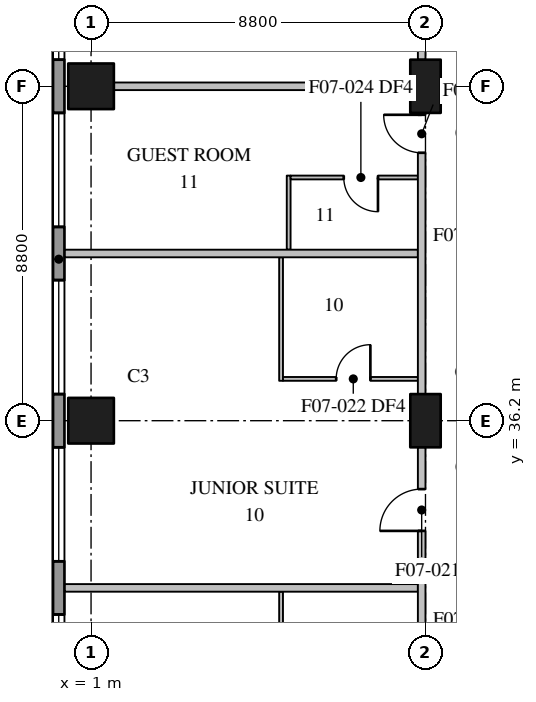
"""IFC4 building model, lengths in metres.
Left out: names, types, materials, properties, quantities, classifications, styles, units other than length and angle.
Written with IfcOpenShell. Run it as: python <this file> out.ifc"""

import sys

from ifc_helpers import new_model, si_unit, direction, frame, frame_2d, origin, origin_2d, place, context, subcontext, project, spatial, rectangle, extrude, element, fill, save


model = new_model("IFC4")
c1 = context("Model", 3, precision=1e-05, world=origin(), true_north=direction((0.0, 1.0)))
c2 = subcontext(c1, "Body", "Model", "MODEL_VIEW")
j1 = project(units=[si_unit("LENGTHUNIT", "METRE"), si_unit("PLANEANGLEUNIT", "RADIAN")], contexts=[c1])
p1 = place(None, origin())
s1 = spatial("IfcSite", under=j1, at=p1, CompositionType="ELEMENT")
p2 = place(p1, origin())
s2 = spatial("IfcBuilding", under=s1, at=p2, CompositionType="ELEMENT")
p3 = place(p2, frame((0.0, 0.0, 87.1)))
s3 = spatial("IfcBuildingStorey", under=s2, at=p3, CompositionType="ELEMENT", Elevation=87.1)
for number, where, z_axis, x_axis in (
    (1, (1.0, 36.2, 0.0), (0.0, 0.0, 1.0), (1.0, 0.0, 0.0)),
    (2, (1.0, 45.0, 0.0), (0.0, 0.0, 1.0), (1.0, 0.0, 0.0)),
):
    element("IfcColumn", number, at=place(p3, frame(where, z_axis=z_axis, x_axis=x_axis)), inside=s3, PredefinedType="COLUMN", context=c2, shape_type="SweptSolid", body=[
        extrude(rectangle(XDim=1.2, YDim=1.2, at=origin_2d()), origin(), (0.0, 0.0, 1.0), 3.7),
    ])
for number, where, z_axis, x_axis in (
    (3, (9.8, 36.2, 0.0), (0.0, 0.0, 1.0), (0.0, 1.0, 0.0)),
    (4, (9.8, 45.0, 0.0), (0.0, 0.0, 1.0), (0.0, 1.0, 0.0)),
):
    element("IfcColumn", number, at=place(p3, frame(where, z_axis=z_axis, x_axis=x_axis)), inside=s3, PredefinedType="COLUMN", context=c2, shape_type="SweptSolid", body=[
        extrude(rectangle(XDim=1.4, YDim=0.8, at=origin_2d()), origin(), (0.0, 0.0, 1.0), 3.7),
    ])
p4 = place(p3, frame((0.15, 78.7, 0.0), z_axis=(0.0, 0.0, 1.0), x_axis=(0.0, -1.0, 0.0)))
e5 = element("IfcWall", 5, at=p4, inside=s3, PredefinedType="STANDARD", context=c2, shape_type="SweptSolid", body=[
    extrude(rectangle(XDim=76.5, YDim=0.3, at=frame_2d((38.25, 0.0))), origin(), (0.0, 0.0, 1.0), 3.4),
])
p5 = place(p4, frame((3.6, 0.0, 0.75)))
e6 = element("IfcOpeningElement", 6, at=p5, cuts=e5, PredefinedType="OPENING", context=c2, shape_type="SweptSolid", body=[
    extrude(rectangle(XDim=3.0, YDim=2.3, at=frame_2d((1.5, 1.15))), frame((0.0, 0.16, 0.0), z_axis=(0.0, -1.0, 0.0), x_axis=(1.0, 0.0, 0.0)), (0.0, 0.0, 1.0), 0.32),
])
p6 = place(p4, frame((8.0, 0.0, 0.75)))
e7 = element("IfcOpeningElement", 7, at=p6, cuts=e5, PredefinedType="OPENING", context=c2, shape_type="SweptSolid", body=[
    extrude(rectangle(XDim=3.0, YDim=2.3, at=frame_2d((1.5, 1.15))), frame((0.0, 0.16, 0.0), z_axis=(0.0, -1.0, 0.0), x_axis=(1.0, 0.0, 0.0)), (0.0, 0.0, 1.0), 0.32),
])
p7 = place(p4, frame((12.4, 0.0, 0.75)))
e8 = element("IfcOpeningElement", 8, at=p7, cuts=e5, PredefinedType="OPENING", context=c2, shape_type="SweptSolid", body=[
    extrude(rectangle(XDim=3.0, YDim=2.3, at=frame_2d((1.5, 1.15))), frame((0.0, 0.16, 0.0), z_axis=(0.0, -1.0, 0.0), x_axis=(1.0, 0.0, 0.0)), (0.0, 0.0, 1.0), 0.32),
])
p8 = place(p4, frame((16.8, 0.0, 0.75)))
e9 = element("IfcOpeningElement", 9, at=p8, cuts=e5, PredefinedType="OPENING", context=c2, shape_type="SweptSolid", body=[
    extrude(rectangle(XDim=3.0, YDim=2.3, at=frame_2d((1.5, 1.15))), frame((0.0, 0.16, 0.0), z_axis=(0.0, -1.0, 0.0), x_axis=(1.0, 0.0, 0.0)), (0.0, 0.0, 1.0), 0.32),
])
p9 = place(p4, frame((21.2, 0.0, 0.75)))
e10 = element("IfcOpeningElement", 10, at=p9, cuts=e5, PredefinedType="OPENING", context=c2, shape_type="SweptSolid", body=[
    extrude(rectangle(XDim=3.0, YDim=2.3, at=frame_2d((1.5, 1.15))), frame((0.0, 0.16, 0.0), z_axis=(0.0, -1.0, 0.0), x_axis=(1.0, 0.0, 0.0)), (0.0, 0.0, 1.0), 0.32),
])
p10 = place(p4, frame((25.6, 0.0, 0.75)))
e11 = element("IfcOpeningElement", 11, at=p10, cuts=e5, PredefinedType="OPENING", context=c2, shape_type="SweptSolid", body=[
    extrude(rectangle(XDim=3.0, YDim=2.3, at=frame_2d((1.5, 1.15))), frame((0.0, 0.16, 0.0), z_axis=(0.0, -1.0, 0.0), x_axis=(1.0, 0.0, 0.0)), (0.0, 0.0, 1.0), 0.32),
])
p11 = place(p4, frame((30.0, 0.0, 0.75)))
e12 = element("IfcOpeningElement", 12, at=p11, cuts=e5, PredefinedType="OPENING", context=c2, shape_type="SweptSolid", body=[
    extrude(rectangle(XDim=3.0, YDim=2.3, at=frame_2d((1.5, 1.15))), frame((0.0, 0.16, 0.0), z_axis=(0.0, -1.0, 0.0), x_axis=(1.0, 0.0, 0.0)), (0.0, 0.0, 1.0), 0.32),
])
p12 = place(p4, frame((34.4, 0.0, 0.75)))
e13 = element("IfcOpeningElement", 13, at=p12, cuts=e5, PredefinedType="OPENING", context=c2, shape_type="SweptSolid", body=[
    extrude(rectangle(XDim=3.0, YDim=2.3, at=frame_2d((1.5, 1.15))), frame((0.0, 0.16, 0.0), z_axis=(0.0, -1.0, 0.0), x_axis=(1.0, 0.0, 0.0)), (0.0, 0.0, 1.0), 0.32),
])
p13 = place(p4, frame((38.8, 0.0, 0.75)))
e14 = element("IfcOpeningElement", 14, at=p13, cuts=e5, PredefinedType="OPENING", context=c2, shape_type="SweptSolid", body=[
    extrude(rectangle(XDim=3.0, YDim=2.3, at=frame_2d((1.5, 1.15))), frame((0.0, 0.16, 0.0), z_axis=(0.0, -1.0, 0.0), x_axis=(1.0, 0.0, 0.0)), (0.0, 0.0, 1.0), 0.32),
])
p14 = place(p4, frame((43.2, 0.0, 0.75)))
e15 = element("IfcOpeningElement", 15, at=p14, cuts=e5, PredefinedType="OPENING", context=c2, shape_type="SweptSolid", body=[
    extrude(rectangle(XDim=3.0, YDim=2.3, at=frame_2d((1.5, 1.15))), frame((0.0, 0.16, 0.0), z_axis=(0.0, -1.0, 0.0), x_axis=(1.0, 0.0, 0.0)), (0.0, 0.0, 1.0), 0.32),
])
p15 = place(p4, frame((47.6, 0.0, 0.75)))
e16 = element("IfcOpeningElement", 16, at=p15, cuts=e5, PredefinedType="OPENING", context=c2, shape_type="SweptSolid", body=[
    extrude(rectangle(XDim=3.0, YDim=2.3, at=frame_2d((1.5, 1.15))), frame((0.0, 0.16, 0.0), z_axis=(0.0, -1.0, 0.0), x_axis=(1.0, 0.0, 0.0)), (0.0, 0.0, 1.0), 0.32),
])
p16 = place(p4, frame((52.0, 0.0, 0.75)))
e17 = element("IfcOpeningElement", 17, at=p16, cuts=e5, PredefinedType="OPENING", context=c2, shape_type="SweptSolid", body=[
    extrude(rectangle(XDim=3.0, YDim=2.3, at=frame_2d((1.5, 1.15))), frame((0.0, 0.16, 0.0), z_axis=(0.0, -1.0, 0.0), x_axis=(1.0, 0.0, 0.0)), (0.0, 0.0, 1.0), 0.32),
])
p17 = place(p4, frame((56.4, 0.0, 0.75)))
e18 = element("IfcOpeningElement", 18, at=p17, cuts=e5, PredefinedType="OPENING", context=c2, shape_type="SweptSolid", body=[
    extrude(rectangle(XDim=3.0, YDim=2.3, at=frame_2d((1.5, 1.15))), frame((0.0, 0.16, 0.0), z_axis=(0.0, -1.0, 0.0), x_axis=(1.0, 0.0, 0.0)), (0.0, 0.0, 1.0), 0.32),
])
p18 = place(p4, frame((60.8, 0.0, 0.75)))
e19 = element("IfcOpeningElement", 19, at=p18, cuts=e5, PredefinedType="OPENING", context=c2, shape_type="SweptSolid", body=[
    extrude(rectangle(XDim=3.0, YDim=2.3, at=frame_2d((1.5, 1.15))), frame((0.0, 0.16, 0.0), z_axis=(0.0, -1.0, 0.0), x_axis=(1.0, 0.0, 0.0)), (0.0, 0.0, 1.0), 0.32),
])
p19 = place(p4, frame((65.2, 0.0, 0.75)))
e20 = element("IfcOpeningElement", 20, at=p19, cuts=e5, PredefinedType="OPENING", context=c2, shape_type="SweptSolid", body=[
    extrude(rectangle(XDim=3.0, YDim=2.3, at=frame_2d((1.5, 1.15))), frame((0.0, 0.16, 0.0), z_axis=(0.0, -1.0, 0.0), x_axis=(1.0, 0.0, 0.0)), (0.0, 0.0, 1.0), 0.32),
])
p20 = place(p4, frame((69.6, 0.0, 0.75)))
e21 = element("IfcOpeningElement", 21, at=p20, cuts=e5, PredefinedType="OPENING", context=c2, shape_type="SweptSolid", body=[
    extrude(rectangle(XDim=3.0, YDim=2.3, at=frame_2d((1.5, 1.15))), frame((0.0, 0.16, 0.0), z_axis=(0.0, -1.0, 0.0), x_axis=(1.0, 0.0, 0.0)), (0.0, 0.0, 1.0), 0.32),
])
p21 = place(p3, frame((9.7, 28.1, 0.0), z_axis=(0.0, 0.0, 1.0), x_axis=(0.0, 1.0, 0.0)))
e22 = element("IfcWall", 22, at=p21, inside=s3, PredefinedType="PARTITIONING", context=c2, shape_type="SweptSolid", body=[
    extrude(rectangle(XDim=7.4, YDim=0.2, at=frame_2d((3.7, 0.0))), origin(), (0.0, 0.0, 1.0), 3.4),
])
p22 = place(p21, frame((5.2, 0.0, 0.0)))
e23 = element("IfcOpeningElement", 23, at=p22, cuts=e22, PredefinedType="OPENING", context=c2, shape_type="SweptSolid", body=[
    extrude(rectangle(XDim=1.1, YDim=2.1, at=frame_2d((0.55, 1.05))), frame((0.0, 0.11, 0.0), z_axis=(0.0, -1.0, 0.0), x_axis=(1.0, 0.0, 0.0)), (0.0, 0.0, 1.0), 0.22),
])
p23 = place(p3, frame((9.7, 36.9, 0.0), z_axis=(0.0, 0.0, 1.0), x_axis=(0.0, 1.0, 0.0)))
e24 = element("IfcWall", 24, at=p23, inside=s3, PredefinedType="PARTITIONING", context=c2, shape_type="SweptSolid", body=[
    extrude(rectangle(XDim=7.4, YDim=0.2, at=frame_2d((3.7, 0.0))), origin(), (0.0, 0.0, 1.0), 3.4),
])
p24 = place(p23, frame((6.35, 0.0, 0.0)))
e25 = element("IfcOpeningElement", 25, at=p24, cuts=e24, PredefinedType="OPENING", context=c2, shape_type="SweptSolid", body=[
    extrude(rectangle(XDim=1.0, YDim=2.1, at=frame_2d((0.5, 1.05))), frame((0.0, 0.11, 0.0), z_axis=(0.0, -1.0, 0.0), x_axis=(1.0, 0.0, 0.0)), (0.0, 0.0, 1.0), 0.22),
])
p25 = place(p3, frame((9.7, 45.7, 0.0), z_axis=(0.0, 0.0, 1.0), x_axis=(0.0, 1.0, 0.0)))
e26 = element("IfcWall", 26, at=p25, inside=s3, PredefinedType="PARTITIONING", context=c2, shape_type="SweptSolid", body=[
    extrude(rectangle(XDim=7.4, YDim=0.2, at=frame_2d((3.7, 0.0))), origin(), (0.0, 0.0, 1.0), 3.4),
])
p26 = place(p25, frame((0.45, 0.0, 0.0)))
e27 = element("IfcOpeningElement", 27, at=p26, cuts=e26, PredefinedType="OPENING", context=c2, shape_type="SweptSolid", body=[
    extrude(rectangle(XDim=1.1, YDim=2.1, at=frame_2d((0.55, 1.05))), frame((0.0, 0.11, 0.0), z_axis=(0.0, -1.0, 0.0), x_axis=(1.0, 0.0, 0.0)), (0.0, 0.0, 1.0), 0.22),
])
for number, where, z_axis, x_axis in (
    (28, (0.31, 31.8, 0.0), (0.0, 0.0, 1.0), (1.0, 0.0, 0.0)),
    (29, (0.31, 40.6, 0.0), (0.0, 0.0, 1.0), (1.0, 0.0, 0.0)),
):
    element("IfcWall", number, at=place(p3, frame(where, z_axis=z_axis, x_axis=x_axis)), inside=s3, PredefinedType="PARTITIONING", context=c2, shape_type="SweptSolid", body=[
        extrude(rectangle(XDim=9.29, YDim=0.2, at=frame_2d((4.645, 0.0))), origin(), (0.0, 0.0, 1.0), 3.4),
    ])
p27 = place(p3, frame((1.6, 45.0, 0.0), z_axis=(0.0, 0.0, 1.0), x_axis=(1.0, 0.0, 0.0)))
e30 = element("IfcWall", 30, at=p27, inside=s3, PredefinedType="PARTITIONING", context=c2, shape_type="SweptSolid", body=[
    extrude(rectangle(XDim=7.8, YDim=0.2, at=frame_2d((3.9, 0.0))), origin(), (0.0, 0.0, 1.0), 3.4),
])
p28 = place(p3, frame((6.2, 40.7, 0.0), z_axis=(0.0, 0.0, 1.0), x_axis=(0.0, 1.0, 0.0)))
e31 = element("IfcWall", 31, at=p28, inside=s3, PredefinedType="PARTITIONING", context=c2, shape_type="SweptSolid", body=[
    extrude(rectangle(XDim=1.95, YDim=0.1, at=frame_2d((0.975, 0.0))), origin(), (0.0, 0.0, 1.0), 3.4),
])
for number, where, z_axis, x_axis in (
    (32, (6.0, 28.45, 0.0), (0.0, 0.0, 1.0), (0.0, 1.0, 0.0)),
    (33, (6.0, 37.25, 0.0), (0.0, 0.0, 1.0), (0.0, 1.0, 0.0)),
):
    element("IfcWall", number, at=place(p3, frame(where, z_axis=z_axis, x_axis=x_axis)), inside=s3, PredefinedType="PARTITIONING", context=c2, shape_type="SweptSolid", body=[
        extrude(rectangle(XDim=3.25, YDim=0.1, at=frame_2d((1.625, 0.0))), origin(), (0.0, 0.0, 1.0), 3.4),
    ])
p29 = place(p3, frame((6.05, 37.3, 0.0), z_axis=(0.0, 0.0, 1.0), x_axis=(1.0, 0.0, 0.0)))
e34 = element("IfcWall", 34, at=p29, inside=s3, PredefinedType="PARTITIONING", context=c2, shape_type="SweptSolid", body=[
    extrude(rectangle(XDim=3.55, YDim=0.1, at=frame_2d((1.775, 0.0))), origin(), (0.0, 0.0, 1.0), 3.4),
])
p30 = place(p29, frame((1.4, 0.0, 0.0)))
e35 = element("IfcOpeningElement", 35, at=p30, cuts=e34, PredefinedType="OPENING", context=c2, shape_type="SweptSolid", body=[
    extrude(rectangle(XDim=0.9, YDim=2.1, at=frame_2d((0.45, 1.05))), frame((0.0, 0.06, 0.0), z_axis=(0.0, -1.0, 0.0), x_axis=(1.0, 0.0, 0.0)), (0.0, 0.0, 1.0), 0.12),
])
p31 = place(p3, frame((9.6, 42.6, 0.0), z_axis=(0.0, 0.0, 1.0), x_axis=(-1.0, 0.0, 0.0)))
e36 = element("IfcWall", 36, at=p31, inside=s3, PredefinedType="PARTITIONING", context=c2, shape_type="SweptSolid", body=[
    extrude(rectangle(XDim=3.35, YDim=0.1, at=frame_2d((1.675, 0.0))), origin(), (0.0, 0.0, 1.0), 3.4),
])
p32 = place(p31, frame((1.05, 0.0, 0.0)))
e37 = element("IfcOpeningElement", 37, at=p32, cuts=e36, PredefinedType="OPENING", context=c2, shape_type="SweptSolid", body=[
    extrude(rectangle(XDim=0.9, YDim=2.1, at=frame_2d((0.45, 1.05))), frame((0.0, 0.06, 0.0), z_axis=(0.0, -1.0, 0.0), x_axis=(1.0, 0.0, 0.0)), (0.0, 0.0, 1.0), 0.12),
])
p33 = place(p11, origin())
e38 = element("IfcWindow", 38, at=p33, inside=s3, PartitioningType="SINGLE_PANEL", PredefinedType="WINDOW", context=c2, shape_type="SweptSolid", body=[
    extrude(rectangle(XDim=3.0, YDim=2.3, at=frame_2d((1.5, 1.15))), frame((0.0, 0.03, 0.0), z_axis=(0.0, -1.0, 0.0), x_axis=(1.0, 0.0, 0.0)), (0.0, 0.0, 1.0), 0.06),
])
fill(e12, e38)
p34 = place(p12, origin())
e39 = element("IfcWindow", 39, at=p34, inside=s3, PartitioningType="SINGLE_PANEL", PredefinedType="WINDOW", context=c2, shape_type="SweptSolid", body=[
    extrude(rectangle(XDim=3.0, YDim=2.3, at=frame_2d((1.5, 1.15))), frame((0.0, 0.03, 0.0), z_axis=(0.0, -1.0, 0.0), x_axis=(1.0, 0.0, 0.0)), (0.0, 0.0, 1.0), 0.06),
])
fill(e13, e39)
p35 = place(p13, origin())
e40 = element("IfcWindow", 40, at=p35, inside=s3, PartitioningType="SINGLE_PANEL", PredefinedType="WINDOW", context=c2, shape_type="SweptSolid", body=[
    extrude(rectangle(XDim=3.0, YDim=2.3, at=frame_2d((1.5, 1.15))), frame((0.0, 0.03, 0.0), z_axis=(0.0, -1.0, 0.0), x_axis=(1.0, 0.0, 0.0)), (0.0, 0.0, 1.0), 0.06),
])
fill(e14, e40)
p36 = place(p14, origin())
e41 = element("IfcWindow", 41, at=p36, inside=s3, PartitioningType="SINGLE_PANEL", PredefinedType="WINDOW", context=c2, shape_type="SweptSolid", body=[
    extrude(rectangle(XDim=3.0, YDim=2.3, at=frame_2d((1.5, 1.15))), frame((0.0, 0.03, 0.0), z_axis=(0.0, -1.0, 0.0), x_axis=(1.0, 0.0, 0.0)), (0.0, 0.0, 1.0), 0.06),
])
fill(e15, e41)
p37 = place(p15, origin())
e42 = element("IfcWindow", 42, at=p37, inside=s3, PartitioningType="SINGLE_PANEL", PredefinedType="WINDOW", context=c2, shape_type="SweptSolid", body=[
    extrude(rectangle(XDim=3.0, YDim=2.3, at=frame_2d((1.5, 1.15))), frame((0.0, 0.03, 0.0), z_axis=(0.0, -1.0, 0.0), x_axis=(1.0, 0.0, 0.0)), (0.0, 0.0, 1.0), 0.06),
])
fill(e16, e42)
p38 = place(p22, origin())
e43 = element("IfcDoor", 43, at=p38, inside=s3, OperationType="SINGLE_SWING_LEFT", PredefinedType="DOOR", context=c2, shape_type="SweptSolid", body=[
    extrude(rectangle(XDim=1.1, YDim=2.1, at=frame_2d((0.55, 1.05))), frame((0.0, 0.025, 0.0), z_axis=(0.0, -1.0, 0.0), x_axis=(1.0, 0.0, 0.0)), (0.0, 0.0, 1.0), 0.05),
])
fill(e23, e43)
p39 = place(p30, origin())
e44 = element("IfcDoor", 44, at=p39, inside=s3, OperationType="SINGLE_SWING_RIGHT", PredefinedType="DOOR", context=c2, shape_type="SweptSolid", body=[
    extrude(rectangle(XDim=0.9, YDim=2.1, at=frame_2d((0.45, 1.05))), frame((0.0, 0.025, 0.0), z_axis=(0.0, -1.0, 0.0), x_axis=(1.0, 0.0, 0.0)), (0.0, 0.0, 1.0), 0.05),
])
fill(e35, e44)
p40 = place(p24, origin())
e45 = element("IfcDoor", 45, at=p40, inside=s3, OperationType="SINGLE_SWING_RIGHT", PredefinedType="DOOR", context=c2, shape_type="SweptSolid", body=[
    extrude(rectangle(XDim=1.0, YDim=2.1, at=frame_2d((0.5, 1.05))), frame((0.0, 0.025, 0.0), z_axis=(0.0, -1.0, 0.0), x_axis=(1.0, 0.0, 0.0)), (0.0, 0.0, 1.0), 0.05),
])
fill(e25, e45)
p41 = place(p32, origin())
e46 = element("IfcDoor", 46, at=p41, inside=s3, OperationType="SINGLE_SWING_LEFT", PredefinedType="DOOR", context=c2, shape_type="SweptSolid", body=[
    extrude(rectangle(XDim=0.9, YDim=2.1, at=frame_2d((0.45, 1.05))), frame((0.0, 0.025, 0.0), z_axis=(0.0, -1.0, 0.0), x_axis=(1.0, 0.0, 0.0)), (0.0, 0.0, 1.0), 0.05),
])
fill(e37, e46)
save(model, sys.argv[1])
